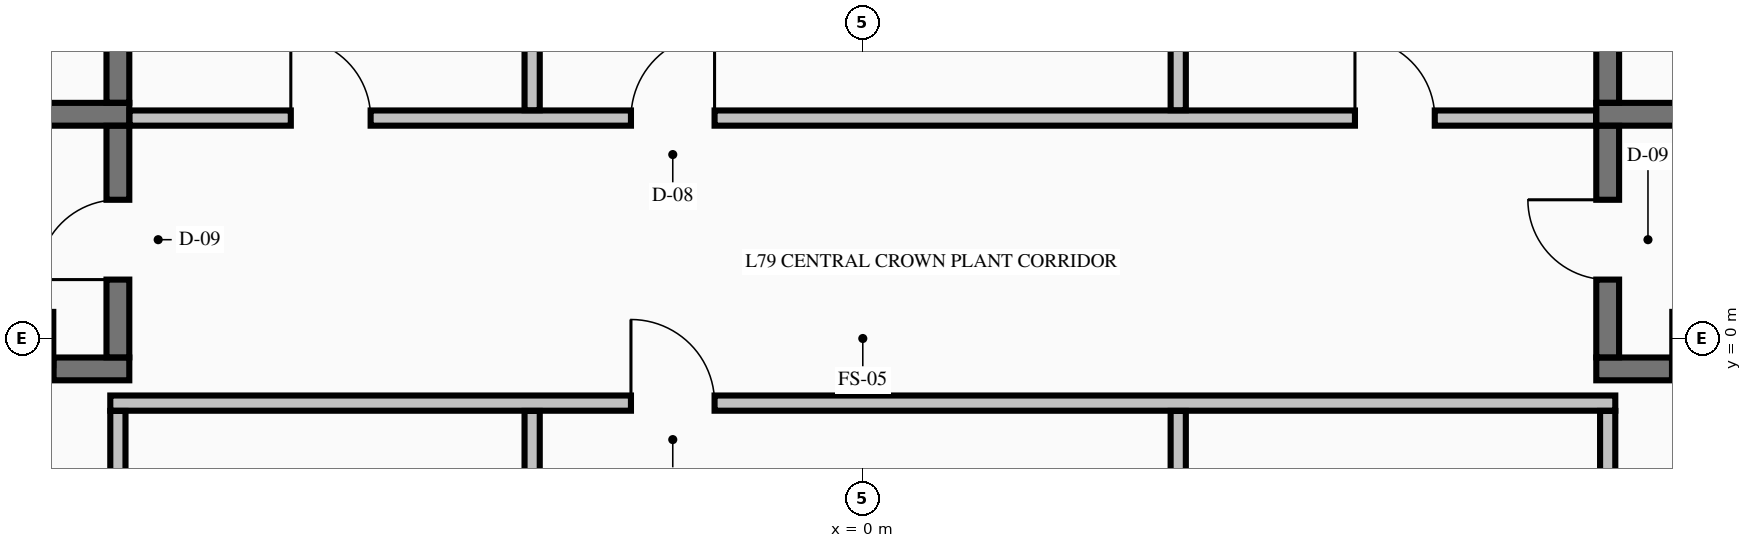
"""IFC4 building model, lengths in metres.
Left out: names, types, materials, properties, quantities, classifications, styles, units other than length and angle.
Written with IfcOpenShell. Run it as: python <this file> out.ifc"""

import sys

from ifc_helpers import new_model, si_unit, direction, frame, frame_2d, origin, origin_2d, place, context, subcontext, project, spatial, rectangle, extrude, element, fill, save


model = new_model("IFC4")
c1 = context("Model", 3, precision=1e-05, world=origin(), true_north=direction((0.0, 1.0)))
c2 = subcontext(c1, "Body", "Model", "MODEL_VIEW")
j1 = project(units=[si_unit("LENGTHUNIT", "METRE"), si_unit("PLANEANGLEUNIT", "RADIAN")], contexts=[c1])
p1 = place(None, origin())
s1 = spatial("IfcSite", under=j1, at=p1, CompositionType="ELEMENT")
p2 = place(p1, origin())
s2 = spatial("IfcBuilding", under=s1, at=p2, CompositionType="ELEMENT")
p3 = place(p2, frame((0.0, 0.0, 294.04)))
s3 = spatial("IfcBuildingStorey", under=s2, at=p3, CompositionType="ELEMENT", Elevation=294.04)
for number, where, z_axis, x_axis in (
    (1, (-11.0, 0.0, -0.325), (0.0, 0.0, 1.0), (1.0, 0.0, 0.0)),
    (2, (11.0, 0.0, -0.325), (0.0, 0.0, 1.0), (1.0, 0.0, 0.0)),
):
    element("IfcColumn", number, at=place(p3, frame(where, z_axis=z_axis, x_axis=x_axis)), inside=s3, PredefinedType="COLUMN", context=c2, shape_type="SweptSolid", body=[
        extrude(rectangle(XDim=0.7, YDim=0.7, at=origin_2d()), origin(), (0.0, 0.0, 1.0), 2.935),
    ])
for number, where, z_axis, x_axis in (
    (3, (-10.646, -0.4, 0.0), (0.0, 0.0, 1.0), (1.0, 0.0, 0.0)),
    (4, (9.65, -0.4, 0.0), (0.0, 0.0, 1.0), (1.0, 0.0, 0.0)),
):
    element("IfcWall", number, at=place(p3, frame(where, z_axis=z_axis, x_axis=x_axis)), inside=s3, PredefinedType="SHEAR", context=c2, shape_type="SweptSolid", body=[
        extrude(rectangle(XDim=0.996, YDim=0.3, at=frame_2d((0.498, 0.0))), origin(), (0.0, 0.0, 1.0), 2.61),
    ])
p4 = place(p3, frame((-13.4, 2.95, 0.0), z_axis=(0.0, 0.0, 1.0), x_axis=(1.0, 0.0, 0.0)))
e5 = element("IfcWall", 5, at=p4, inside=s3, PredefinedType="SHEAR", context=c2, shape_type="SweptSolid", body=[
    extrude(rectangle(XDim=3.75, YDim=0.3, at=frame_2d((1.875, 0.0))), origin(), (0.0, 0.0, 1.0), 2.61),
])
p5 = place(p4, frame((0.6, 0.0, 0.0)))
e6 = element("IfcOpeningElement", 6, at=p5, cuts=e5, PredefinedType="OPENING", context=c2, shape_type="SweptSolid", body=[
    extrude(rectangle(XDim=1.1, YDim=2.2, at=frame_2d((0.55, 1.1))), frame((0.0, 0.16, 0.0), z_axis=(0.0, -1.0, 0.0), x_axis=(1.0, 0.0, 0.0)), (0.0, 0.0, 1.0), 0.32),
])
p6 = place(p3, frame((9.65, 2.95, 0.0), z_axis=(0.0, 0.0, 1.0), x_axis=(1.0, 0.0, 0.0)))
e7 = element("IfcWall", 7, at=p6, inside=s3, PredefinedType="SHEAR", context=c2, shape_type="SweptSolid", body=[
    extrude(rectangle(XDim=3.75, YDim=0.3, at=frame_2d((1.875, 0.0))), origin(), (0.0, 0.0, 1.0), 2.61),
])
p7 = place(p6, frame((2.05, 0.0, 0.0)))
e8 = element("IfcOpeningElement", 8, at=p7, cuts=e7, PredefinedType="OPENING", context=c2, shape_type="SweptSolid", body=[
    extrude(rectangle(XDim=1.1, YDim=2.2, at=frame_2d((0.55, 1.1))), frame((0.0, 0.16, 0.0), z_axis=(0.0, -1.0, 0.0), x_axis=(1.0, 0.0, 0.0)), (0.0, 0.0, 1.0), 0.32),
])
p8 = place(p3, frame((-9.9, -0.85, 0.0), z_axis=(0.0, 0.0, 1.0), x_axis=(1.0, 0.0, 0.0)))
e9 = element("IfcWall", 9, at=p8, inside=s3, PredefinedType="PARTITIONING", context=c2, shape_type="SweptSolid", body=[
    extrude(rectangle(XDim=19.8, YDim=0.2, at=frame_2d((9.9, 0.0))), origin(), (0.0, 0.0, 1.0), 2.61),
])
p9 = place(p8, frame((6.85, 0.0, 0.0)))
e10 = element("IfcOpeningElement", 10, at=p9, cuts=e9, PredefinedType="OPENING", context=c2, shape_type="SweptSolid", body=[
    extrude(rectangle(XDim=1.1, YDim=2.15, at=frame_2d((0.55, 1.075))), frame((0.0, 0.11, 0.0), z_axis=(0.0, -1.0, 0.0), x_axis=(1.0, 0.0, 0.0)), (0.0, 0.0, 1.0), 0.22),
])
p10 = place(p3, frame((-9.647, 2.9, 0.0), z_axis=(0.0, 0.0, 1.0), x_axis=(1.0, 0.0, 0.0)))
e11 = element("IfcWall", 11, at=p10, inside=s3, PredefinedType="PARTITIONING", context=c2, shape_type="SweptSolid", body=[
    extrude(rectangle(XDim=19.294, YDim=0.2, at=frame_2d((9.647, 0.0))), origin(), (0.0, 0.0, 1.0), 2.61),
])
p11 = place(p10, frame((6.597, 0.0, 0.0)))
e12 = element("IfcOpeningElement", 12, at=p11, cuts=e11, PredefinedType="OPENING", context=c2, shape_type="SweptSolid", body=[
    extrude(rectangle(XDim=1.1, YDim=2.15, at=frame_2d((0.55, 1.075))), frame((0.0, 0.11, 0.0), z_axis=(0.0, -1.0, 0.0), x_axis=(1.0, 0.0, 0.0)), (0.0, 0.0, 1.0), 0.22),
])
p12 = place(p10, frame((16.122, 0.0, 0.0)))
e13 = element("IfcOpeningElement", 13, at=p12, cuts=e11, PredefinedType="OPENING", context=c2, shape_type="SweptSolid", body=[
    extrude(rectangle(XDim=1.05, YDim=2.15, at=frame_2d((0.525, 1.075))), frame((0.0, 0.11, 0.0), z_axis=(0.0, -1.0, 0.0), x_axis=(1.0, 0.0, 0.0)), (0.0, 0.0, 1.0), 0.22),
])
p13 = place(p10, frame((2.122, 0.0, 0.0)))
e14 = element("IfcOpeningElement", 14, at=p13, cuts=e11, PredefinedType="OPENING", context=c2, shape_type="SweptSolid", body=[
    extrude(rectangle(XDim=1.05, YDim=2.15, at=frame_2d((0.525, 1.075))), frame((0.0, 0.11, 0.0), z_axis=(0.0, -1.0, 0.0), x_axis=(1.0, 0.0, 0.0)), (0.0, 0.0, 1.0), 0.22),
])
p14 = place(p3, frame((-9.8, -0.248, 0.0), z_axis=(0.0, 0.0, 1.0), x_axis=(0.0, 1.0, 0.0)))
e15 = element("IfcWall", 15, at=p14, inside=s3, PredefinedType="SHEAR", context=c2, shape_type="SweptSolid", body=[
    extrude(rectangle(XDim=3.046, YDim=0.3, at=frame_2d((1.523, 0.0))), origin(), (0.0, 0.0, 1.0), 2.61),
])
p15 = place(p14, frame((1.023, 0.0, 0.0)))
e16 = element("IfcOpeningElement", 16, at=p15, cuts=e15, PredefinedType="OPENING", context=c2, shape_type="SweptSolid", body=[
    extrude(rectangle(XDim=1.05, YDim=2.15, at=frame_2d((0.525, 1.075))), frame((0.0, 0.16, 0.0), z_axis=(0.0, -1.0, 0.0), x_axis=(1.0, 0.0, 0.0)), (0.0, 0.0, 1.0), 0.32),
])
p16 = place(p3, frame((-9.8, 3.102, 0.0), z_axis=(0.0, 0.0, 1.0), x_axis=(0.0, 1.0, 0.0)))
e17 = element("IfcWall", 17, at=p16, inside=s3, PredefinedType="SHEAR", context=c2, shape_type="SweptSolid", body=[
    extrude(rectangle(XDim=2.396, YDim=0.3, at=frame_2d((1.198, 0.0))), origin(), (0.0, 0.0, 1.0), 2.61),
])
p17 = place(p3, frame((9.8, -0.248, 0.0), z_axis=(0.0, 0.0, 1.0), x_axis=(0.0, 1.0, 0.0)))
e18 = element("IfcWall", 18, at=p17, inside=s3, PredefinedType="SHEAR", context=c2, shape_type="SweptSolid", body=[
    extrude(rectangle(XDim=3.046, YDim=0.3, at=frame_2d((1.523, 0.0))), origin(), (0.0, 0.0, 1.0), 2.61),
])
p18 = place(p17, frame((1.023, 0.0, 0.0)))
e19 = element("IfcOpeningElement", 19, at=p18, cuts=e18, PredefinedType="OPENING", context=c2, shape_type="SweptSolid", body=[
    extrude(rectangle(XDim=1.05, YDim=2.15, at=frame_2d((0.525, 1.075))), frame((0.0, 0.16, 0.0), z_axis=(0.0, -1.0, 0.0), x_axis=(1.0, 0.0, 0.0)), (0.0, 0.0, 1.0), 0.32),
])
p19 = place(p3, frame((9.8, 3.102, 0.0), z_axis=(0.0, 0.0, 1.0), x_axis=(0.0, 1.0, 0.0)))
e20 = element("IfcWall", 20, at=p19, inside=s3, PredefinedType="SHEAR", context=c2, shape_type="SweptSolid", body=[
    extrude(rectangle(XDim=2.396, YDim=0.3, at=frame_2d((1.198, 0.0))), origin(), (0.0, 0.0, 1.0), 2.61),
])
p20 = place(p3, frame((-9.8, -6.197, 0.0), z_axis=(0.0, 0.0, 1.0), x_axis=(0.0, 1.0, 0.0)))
e21 = element("IfcWall", 21, at=p20, inside=s3, PredefinedType="PARTITIONING", context=c2, shape_type="SweptSolid", body=[
    extrude(rectangle(XDim=5.244, YDim=0.2, at=frame_2d((2.622, 0.0))), origin(), (0.0, 0.0, 1.0), 2.61),
])
p21 = place(p3, frame((-4.35, -6.172, 0.0), z_axis=(0.0, 0.0, 1.0), x_axis=(0.0, 1.0, 0.0)))
e22 = element("IfcWall", 22, at=p21, inside=s3, PredefinedType="PARTITIONING", context=c2, shape_type="SweptSolid", body=[
    extrude(rectangle(XDim=5.219, YDim=0.2, at=frame_2d((2.61, 0.0))), origin(), (0.0, 0.0, 1.0), 2.61),
])
p22 = place(p21, frame((2.447, 0.0, 0.0)))
e23 = element("IfcOpeningElement", 23, at=p22, cuts=e22, PredefinedType="OPENING", context=c2, shape_type="SweptSolid", body=[
    extrude(rectangle(XDim=1.05, YDim=2.15, at=frame_2d((0.525, 1.075))), frame((0.0, 0.11, 0.0), z_axis=(0.0, -1.0, 0.0), x_axis=(1.0, 0.0, 0.0)), (0.0, 0.0, 1.0), 0.22),
])
p23 = place(p3, frame((-4.35, 3.003, 0.0), z_axis=(0.0, 0.0, 1.0), x_axis=(0.0, 1.0, 0.0)))
e24 = element("IfcWall", 24, at=p23, inside=s3, PredefinedType="PARTITIONING", context=c2, shape_type="SweptSolid", body=[
    extrude(rectangle(XDim=3.169, YDim=0.2, at=frame_2d((1.584, 0.0))), origin(), (0.0, 0.0, 1.0), 2.61),
])
p24 = place(p3, frame((4.15, -6.172, 0.0), z_axis=(0.0, 0.0, 1.0), x_axis=(0.0, 1.0, 0.0)))
e25 = element("IfcWall", 25, at=p24, inside=s3, PredefinedType="PARTITIONING", context=c2, shape_type="SweptSolid", body=[
    extrude(rectangle(XDim=5.219, YDim=0.2, at=frame_2d((2.61, 0.0))), origin(), (0.0, 0.0, 1.0), 2.61),
])
p25 = place(p24, frame((2.447, 0.0, 0.0)))
e26 = element("IfcOpeningElement", 26, at=p25, cuts=e25, PredefinedType="OPENING", context=c2, shape_type="SweptSolid", body=[
    extrude(rectangle(XDim=1.05, YDim=2.15, at=frame_2d((0.525, 1.075))), frame((0.0, 0.11, 0.0), z_axis=(0.0, -1.0, 0.0), x_axis=(1.0, 0.0, 0.0)), (0.0, 0.0, 1.0), 0.22),
])
p26 = place(p3, frame((4.15, 3.003, 0.0), z_axis=(0.0, 0.0, 1.0), x_axis=(0.0, 1.0, 0.0)))
e27 = element("IfcWall", 27, at=p26, inside=s3, PredefinedType="PARTITIONING", context=c2, shape_type="SweptSolid", body=[
    extrude(rectangle(XDim=3.169, YDim=0.2, at=frame_2d((1.584, 0.0))), origin(), (0.0, 0.0, 1.0), 2.61),
])
p27 = place(p3, frame((9.8, -6.197, 0.0), z_axis=(0.0, 0.0, 1.0), x_axis=(0.0, 1.0, 0.0)))
e28 = element("IfcWall", 28, at=p27, inside=s3, PredefinedType="PARTITIONING", context=c2, shape_type="SweptSolid", body=[
    extrude(rectangle(XDim=5.244, YDim=0.2, at=frame_2d((2.622, 0.0))), origin(), (0.0, 0.0, 1.0), 2.61),
])
p28 = place(p15, origin())
e29 = element("IfcDoor", 29, at=p28, inside=s3, OperationType="SINGLE_SWING_LEFT", PredefinedType="DOOR", context=c2, shape_type="SweptSolid", body=[
    extrude(rectangle(XDim=1.05, YDim=2.15, at=frame_2d((0.525, 1.075))), frame((0.0, 0.025, 0.0), z_axis=(0.0, -1.0, 0.0), x_axis=(1.0, 0.0, 0.0)), (0.0, 0.0, 1.0), 0.05),
])
fill(e16, e29)
p29 = place(p18, origin())
e30 = element("IfcDoor", 30, at=p29, inside=s3, OperationType="SINGLE_SWING_RIGHT", PredefinedType="DOOR", context=c2, shape_type="SweptSolid", body=[
    extrude(rectangle(XDim=1.05, YDim=2.15, at=frame_2d((0.525, 1.075))), frame((0.0, 0.025, 0.0), z_axis=(0.0, -1.0, 0.0), x_axis=(1.0, 0.0, 0.0)), (0.0, 0.0, 1.0), 0.05),
])
fill(e19, e30)
p30 = place(p9, origin())
e31 = element("IfcDoor", 31, at=p30, inside=s3, OperationType="SINGLE_SWING_LEFT", PredefinedType="DOOR", context=c2, shape_type="SweptSolid", body=[
    extrude(rectangle(XDim=1.1, YDim=2.15, at=frame_2d((0.55, 1.075))), frame((0.0, 0.025, 0.0), z_axis=(0.0, -1.0, 0.0), x_axis=(1.0, 0.0, 0.0)), (0.0, 0.0, 1.0), 0.05),
])
fill(e10, e31)
p31 = place(p11, origin())
e32 = element("IfcDoor", 32, at=p31, inside=s3, OperationType="SINGLE_SWING_RIGHT", PredefinedType="DOOR", context=c2, shape_type="SweptSolid", body=[
    extrude(rectangle(XDim=1.1, YDim=2.15, at=frame_2d((0.55, 1.075))), frame((0.0, 0.025, 0.0), z_axis=(0.0, -1.0, 0.0), x_axis=(1.0, 0.0, 0.0)), (0.0, 0.0, 1.0), 0.05),
])
fill(e12, e32)
p32 = place(p12, origin())
e33 = element("IfcDoor", 33, at=p32, inside=s3, OperationType="SINGLE_SWING_LEFT", PredefinedType="DOOR", context=c2, shape_type="SweptSolid", body=[
    extrude(rectangle(XDim=1.05, YDim=2.15, at=frame_2d((0.525, 1.075))), frame((0.0, 0.025, 0.0), z_axis=(0.0, -1.0, 0.0), x_axis=(1.0, 0.0, 0.0)), (0.0, 0.0, 1.0), 0.05),
])
fill(e13, e33)
p33 = place(p13, origin())
e34 = element("IfcDoor", 34, at=p33, inside=s3, OperationType="SINGLE_SWING_LEFT", PredefinedType="DOOR", context=c2, shape_type="SweptSolid", body=[
    extrude(rectangle(XDim=1.05, YDim=2.15, at=frame_2d((0.525, 1.075))), frame((0.0, 0.025, 0.0), z_axis=(0.0, -1.0, 0.0), x_axis=(1.0, 0.0, 0.0)), (0.0, 0.0, 1.0), 0.05),
])
fill(e14, e34)
save(model, sys.argv[1])
